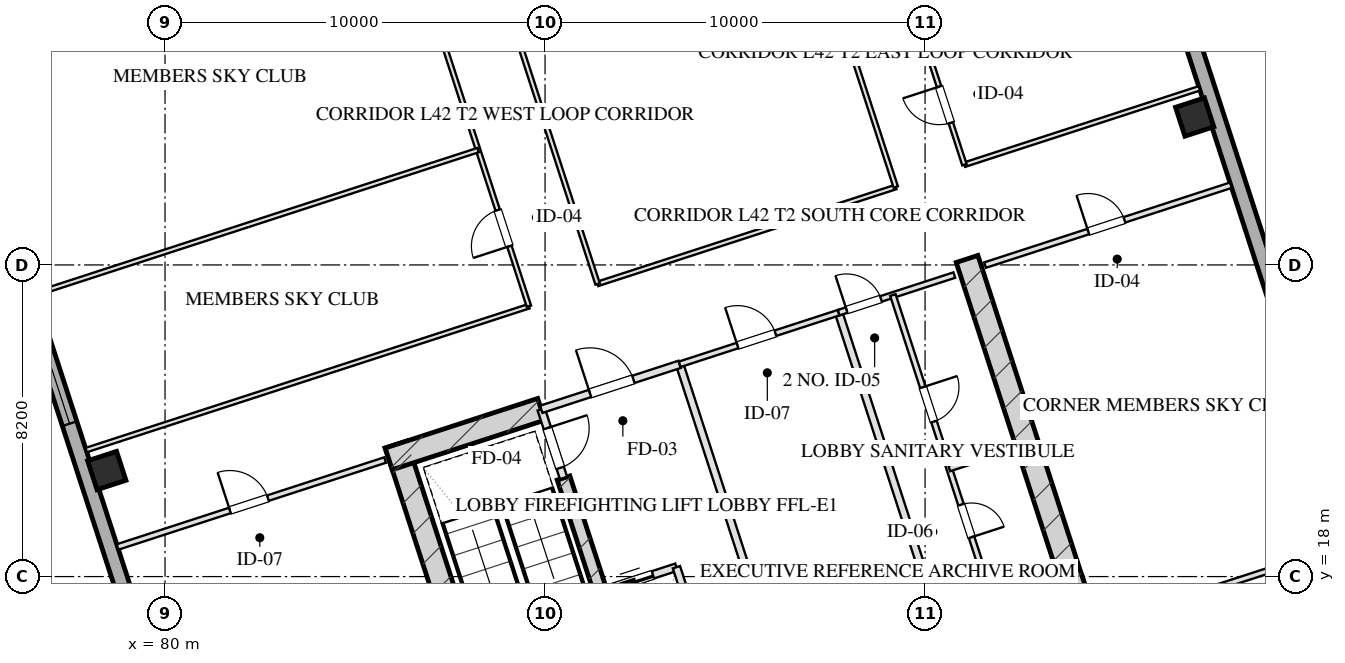
"""IFC4 building model, lengths in metres.
Left out: names, types, materials, properties, quantities, classifications, styles, units other than length and angle.
Written with IfcOpenShell. Run it as: python <this file> out.ifc"""

import sys

from ifc_helpers import new_model, si_unit, direction, frame, frame_2d, origin, origin_2d, place, context, subcontext, project, spatial, rectangle, hollow_rectangle, extrude, element, fill, save


model = new_model("IFC4")
c1 = context("Model", 3, precision=1e-05, world=origin(), true_north=direction((0.0, 1.0)))
c2 = subcontext(c1, "Body", "Model", "MODEL_VIEW")
j1 = project(units=[si_unit("LENGTHUNIT", "METRE"), si_unit("PLANEANGLEUNIT", "RADIAN")], contexts=[c1])
p1 = place(None, origin())
s1 = spatial("IfcSite", under=j1, at=p1, CompositionType="ELEMENT")
p2 = place(p1, origin())
s2 = spatial("IfcBuilding", under=s1, at=p2, CompositionType="ELEMENT")
p3 = place(p2, frame((0.0, 0.0, 159.85)))
s3 = spatial("IfcBuildingStorey", under=s2, at=p3, CompositionType="ELEMENT", Elevation=159.85)
p4 = place(p3, frame((88.63, 12.652, 0.0), z_axis=(0.0, 0.0, 1.0), x_axis=(0.95105714907, 0.309015046886, 0.0)))
e1 = element("IfcWall", 1, at=p4, inside=s3, PredefinedType="SHEAR", context=c2, shape_type="SweptSolid", body=[
    extrude(rectangle(XDim=16.4, YDim=0.6, at=frame_2d((8.2, 0.0))), origin(), (0.0, 0.0, 1.0), 3.45),
])
p5 = place(p3, frame((86.078, 21.475, 0.0), z_axis=(0.0, 0.0, 1.0), x_axis=(0.309017938678, -0.951056209472, 0.0)))
e2 = element("IfcWall", 2, at=p5, inside=s3, PredefinedType="SHEAR", context=c2, shape_type="SweptSolid", body=[
    extrude(rectangle(XDim=9.48, YDim=0.6, at=frame_2d((4.74, 0.0))), origin(), (0.0, 0.0, 1.0), 3.45),
])
p6 = place(p3, frame((101.105, 26.358, 0.0), z_axis=(0.0, 0.0, 1.0), x_axis=(0.309010370028, -0.95105866865, 0.0)))
e3 = element("IfcWall", 3, at=p6, inside=s3, PredefinedType="SHEAR", context=c2, shape_type="SweptSolid", body=[
    extrude(rectangle(XDim=9.48, YDim=0.6, at=frame_2d((4.74, 0.0))), origin(), (0.0, 0.0, 1.0), 3.45),
])
p7 = place(p3, frame((90.486, 20.594, 0.0), z_axis=(0.0, 0.0, 1.0), x_axis=(0.309020428229, -0.951055400562, 0.0)))
e4 = element("IfcWall", 4, at=p7, inside=s3, PredefinedType="SHEAR", context=c2, shape_type="SweptSolid", body=[
    extrude(rectangle(XDim=6.98, YDim=0.35, at=frame_2d((3.49, 0.0))), origin(), (0.0, 0.0, 1.0), 3.45),
])
p8 = place(p3, frame((85.886, 21.097, 0.0), z_axis=(0.0, 0.0, 1.0), x_axis=(0.951068073652, 0.308981422225, 0.0)))
e5 = element("IfcWall", 5, at=p8, inside=s3, PredefinedType="SHEAR", context=c2, shape_type="SweptSolid", body=[
    extrude(rectangle(XDim=4.22, YDim=0.6, at=frame_2d((2.11, 0.0))), origin(), (0.0, 0.0, 1.0), 3.45),
])
for number, where, z_axis, x_axis in (
    (6, (78.468, 20.79, 0.0), (0.0, 0.0, 1.0), (0.951, 0.309, 0.0)),
    (7, (107.094, 30.091, 0.0), (0.0, 0.0, 1.0), (0.951, 0.309, 0.0)),
):
    element("IfcColumn", number, at=place(p3, frame(where, z_axis=z_axis, x_axis=x_axis)), inside=s3, PredefinedType="COLUMN", context=c2, shape_type="SweptSolid", body=[
        extrude(hollow_rectangle(XDim=0.8, YDim=0.8, WallThickness=0.028, at=origin_2d()), origin(), (0.0, 0.0, 1.0), 3.451),
    ])
p9 = place(p3, frame((81.776, 8.827, 0.0), z_axis=(0.0, 0.0, 1.0), x_axis=(-0.309014228706, 0.951057414911, 0.0)))
e8 = element("IfcWall", 8, at=p9, inside=s3, PredefinedType="SOLIDWALL", context=c2, shape_type="SweptSolid", body=[
    extrude(rectangle(XDim=42.8, YDim=0.4, at=frame_2d((21.4, 0.0))), origin(), (0.0, 0.0, 1.0), 2.61),
])
p10 = place(p9, frame((13.875, 0.0, 0.75)))
e9 = element("IfcOpeningElement", 9, at=p10, cuts=e8, PredefinedType="OPENING", context=c2, shape_type="SweptSolid", body=[
    extrude(rectangle(XDim=2.25, YDim=1.46, at=frame_2d((1.125, 0.73))), frame((0.0, 0.21, 0.0), z_axis=(0.0, -1.0, 0.0), x_axis=(1.0, 0.0, 0.0)), (0.0, 0.0, 1.0), 0.42),
])
p11 = place(p9, frame((26.675, 0.0, 0.75)))
e10 = element("IfcOpeningElement", 10, at=p11, cuts=e8, PredefinedType="OPENING", context=c2, shape_type="SweptSolid", body=[
    extrude(rectangle(XDim=2.25, YDim=1.46, at=frame_2d((1.125, 0.73))), frame((0.0, 0.21, 0.0), z_axis=(0.0, -1.0, 0.0), x_axis=(1.0, 0.0, 0.0)), (0.0, 0.0, 1.0), 0.42),
])
p12 = place(p3, frame((98.224, 59.173, 0.0), z_axis=(0.0, 0.0, 1.0), x_axis=(0.309014228706, -0.951057414911, 0.0)))
e11 = element("IfcWall", 11, at=p12, inside=s3, PredefinedType="SOLIDWALL", context=c2, shape_type="SweptSolid", body=[
    extrude(rectangle(XDim=42.8, YDim=0.4, at=frame_2d((21.4, 0.0))), origin(), (0.0, 0.0, 1.0), 2.61),
])
p13 = place(p3, frame((89.899, 22.401, 0.0), z_axis=(0.0, 0.0, 1.0), x_axis=(0.308932062672, -0.951084108086, 0.0)))
e12 = element("IfcWall", 12, at=p13, inside=s3, PredefinedType="PARTITIONING", context=c2, shape_type="SweptSolid", body=[
    extrude(rectangle(XDim=1.9, YDim=0.2, at=frame_2d((0.95, 0.0))), origin(), (0.0, 0.0, 1.0), 3.175),
])
p14 = place(p13, frame((0.52, 0.0, 0.0)))
e13 = element("IfcOpeningElement", 13, at=p14, cuts=e12, PredefinedType="OPENING", context=c2, shape_type="SweptSolid", body=[
    extrude(rectangle(XDim=1.1, YDim=2.05, at=frame_2d((0.55, 1.025))), frame((0.0, 0.11, 0.0), z_axis=(0.0, -1.0, 0.0), x_axis=(1.0, 0.0, 0.0)), (0.0, 0.0, 1.0), 0.22),
])
p15 = place(p3, frame((93.542, 23.585, 0.0), z_axis=(0.0, 0.0, 1.0), x_axis=(0.309042196757, -0.951048327176, 0.0)))
e14 = element("IfcWall", 14, at=p15, inside=s3, PredefinedType="PARTITIONING", context=c2, shape_type="SweptSolid", body=[
    extrude(rectangle(XDim=8.43, YDim=0.2, at=frame_2d((4.215, 0.0))), origin(), (0.0, 0.0, 1.0), 3.175),
])
p16 = place(p3, frame((89.899, 22.401, 0.0), z_axis=(0.0, 0.0, 1.0), x_axis=(0.951046716504, 0.309047153403, 0.0)))
e15 = element("IfcWall", 15, at=p16, inside=s3, PredefinedType="PARTITIONING", context=c2, shape_type="SweptSolid", body=[
    extrude(rectangle(XDim=3.83, YDim=0.2, at=frame_2d((1.915, 0.0))), origin(), (0.0, 0.0, 1.0), 3.175),
])
p17 = place(p16, frame((1.35, 0.0, 0.0)))
e16 = element("IfcOpeningElement", 16, at=p17, cuts=e15, PredefinedType="OPENING", context=c2, shape_type="SweptSolid", body=[
    extrude(rectangle(XDim=1.2, YDim=2.05, at=frame_2d((0.6, 1.025))), frame((0.0, 0.11, 0.0), z_axis=(0.0, -1.0, 0.0), x_axis=(1.0, 0.0, 0.0)), (0.0, 0.0, 1.0), 0.22),
])
p18 = place(p3, frame((91.46, 17.598, 0.0), z_axis=(0.0, 0.0, 1.0), x_axis=(0.951062257173, 0.308999325213, 0.0)))
e17 = element("IfcWall", 17, at=p18, inside=s3, PredefinedType="PARTITIONING", context=c2, shape_type="SweptSolid", body=[
    extrude(rectangle(XDim=2.1, YDim=0.2, at=frame_2d((1.05, 0.0))), origin(), (0.0, 0.0, 1.0), 3.175),
])
p19 = place(p18, frame((0.35, 0.0, 0.0)))
e18 = element("IfcOpeningElement", 18, at=p19, cuts=e17, PredefinedType="OPENING", context=c2, shape_type="SweptSolid", body=[
    extrude(rectangle(XDim=1.1, YDim=2.05, at=frame_2d((0.55, 1.025))), frame((0.0, 0.11, 0.0), z_axis=(0.0, -1.0, 0.0), x_axis=(1.0, 0.0, 0.0)), (0.0, 0.0, 1.0), 0.22),
])
p20 = place(p3, frame((93.457, 18.247, 0.0), z_axis=(0.0, 0.0, 1.0), x_axis=(0.3089935693, -0.951064127245, 0.0)))
e19 = element("IfcWall", 19, at=p20, inside=s3, PredefinedType="PARTITIONING", context=c2, shape_type="SweptSolid", body=[
    extrude(rectangle(XDim=3.7, YDim=0.2, at=frame_2d((1.85, 0.0))), origin(), (0.0, 0.0, 1.0), 3.175),
])
p21 = place(p3, frame((97.727, 24.944, 0.0), z_axis=(0.0, 0.0, 1.0), x_axis=(0.309016001439, -0.951056838919, 0.0)))
e20 = element("IfcWall", 20, at=p21, inside=s3, PredefinedType="PARTITIONING", context=c2, shape_type="SweptSolid", body=[
    extrude(rectangle(XDim=8.43, YDim=0.2, at=frame_2d((4.215, 0.0))), origin(), (0.0, 0.0, 1.0), 3.175),
])
p22 = place(p3, frame((93.542, 23.585, 0.0), z_axis=(0.0, 0.0, 1.0), x_axis=(0.951063829732, 0.308994485023, 0.0)))
e21 = element("IfcWall", 21, at=p22, inside=s3, PredefinedType="PARTITIONING", context=c2, shape_type="SweptSolid", body=[
    extrude(rectangle(XDim=4.4, YDim=0.15, at=frame_2d((2.2, 0.0))), origin(), (0.0, 0.0, 1.0), 3.175),
])
p23 = place(p22, frame((1.6, 0.0, 0.0)))
e22 = element("IfcOpeningElement", 22, at=p23, cuts=e21, PredefinedType="OPENING", context=c2, shape_type="SweptSolid", body=[
    extrude(rectangle(XDim=1.05, YDim=2.05, at=frame_2d((0.525, 1.025))), frame((0.0, 0.085, 0.0), z_axis=(0.0, -1.0, 0.0), x_axis=(1.0, 0.0, 0.0)), (0.0, 0.0, 1.0), 0.17),
])
p24 = place(p3, frame((97.727, 24.944, 0.0), z_axis=(0.0, 0.0, 1.0), x_axis=(0.951036872128, 0.309077446369, 0.0)))
e23 = element("IfcWall", 23, at=p24, inside=s3, PredefinedType="PARTITIONING", context=c2, shape_type="SweptSolid", body=[
    extrude(rectangle(XDim=3.2, YDim=0.15, at=frame_2d((1.6, 0.0))), origin(), (0.0, 0.0, 1.0), 3.175),
])
p25 = place(p24, frame((0.22, 0.0, 0.0)))
e24 = element("IfcOpeningElement", 24, at=p25, cuts=e23, PredefinedType="OPENING", context=c2, shape_type="SweptSolid", body=[
    extrude(rectangle(XDim=0.95, YDim=2.05, at=frame_2d((0.475, 1.025))), frame((0.0, 0.085, 0.0), z_axis=(0.0, -1.0, 0.0), x_axis=(1.0, 0.0, 0.0)), (0.0, 0.0, 1.0), 0.17),
])
p26 = place(p3, frame((99.153, 25.408, 0.0), z_axis=(0.0, 0.0, 1.0), x_axis=(0.309016001439, -0.951056838919, 0.0)))
e25 = element("IfcWall", 25, at=p26, inside=s3, PredefinedType="PARTITIONING", context=c2, shape_type="SweptSolid", body=[
    extrude(rectangle(XDim=8.43, YDim=0.15, at=frame_2d((4.215, 0.0))), origin(), (0.0, 0.0, 1.0), 3.175),
])
p27 = place(p26, frame((2.55, 0.0, 0.0)))
e26 = element("IfcOpeningElement", 26, at=p27, cuts=e25, PredefinedType="OPENING", context=c2, shape_type="SweptSolid", body=[
    extrude(rectangle(XDim=0.95, YDim=2.05, at=frame_2d((0.475, 1.025))), frame((0.0, 0.085, 0.0), z_axis=(0.0, -1.0, 0.0), x_axis=(1.0, 0.0, 0.0)), (0.0, 0.0, 1.0), 0.17),
])
p28 = place(p26, frame((5.8, 0.0, 0.0)))
e27 = element("IfcOpeningElement", 27, at=p28, cuts=e25, PredefinedType="OPENING", context=c2, shape_type="SweptSolid", body=[
    extrude(rectangle(XDim=0.9, YDim=2.05, at=frame_2d((0.45, 1.025))), frame((0.0, 0.085, 0.0), z_axis=(0.0, -1.0, 0.0), x_axis=(1.0, 0.0, 0.0)), (0.0, 0.0, 1.0), 0.17),
])
p29 = place(p3, frame((100.636, 20.843, 0.0), z_axis=(0.0, 0.0, 1.0), x_axis=(0.951040401051, 0.309066587596, 0.0)))
e28 = element("IfcWall", 28, at=p29, inside=s3, PredefinedType="PARTITIONING", context=c2, shape_type="SweptSolid", body=[
    extrude(rectangle(XDim=1.7, YDim=0.15, at=frame_2d((0.85, 0.0))), origin(), (0.0, 0.0, 1.0), 3.175),
])
p30 = place(p3, frame((78.753, 18.78, 0.0), z_axis=(0.0, 0.0, 1.0), x_axis=(0.951060977215, 0.309003264738, 0.0)))
e29 = element("IfcWall", 29, at=p30, inside=s3, PredefinedType="PARTITIONING", context=c2, shape_type="SweptSolid", body=[
    extrude(rectangle(XDim=7.4, YDim=0.15, at=frame_2d((3.7, 0.0))), origin(), (0.0, 0.0, 1.0), 3.175),
])
p31 = place(p30, frame((3.108, 0.0, 0.0)))
e30 = element("IfcOpeningElement", 30, at=p31, cuts=e29, PredefinedType="OPENING", context=c2, shape_type="SweptSolid", body=[
    extrude(rectangle(XDim=1.05, YDim=2.05, at=frame_2d((0.525, 1.025))), frame((0.0, 0.085, 0.0), z_axis=(0.0, -1.0, 0.0), x_axis=(1.0, 0.0, 0.0)), (0.0, 0.0, 1.0), 0.17),
])
p32 = place(p3, frame((104.653, 16.733, 0.0), z_axis=(0.0, 0.0, 1.0), x_axis=(0.951054383043, 0.309023559774, 0.0)))
e31 = element("IfcWall", 31, at=p32, inside=s3, PredefinedType="PARTITIONING", context=c2, shape_type="SweptSolid", body=[
    extrude(rectangle(XDim=6.8, YDim=0.15, at=frame_2d((3.4, 0.0))), origin(), (0.0, 0.0, 1.0), 3.175),
])
p33 = place(p3, frame((101.578, 26.196, 0.0), z_axis=(0.0, 0.0, 1.0), x_axis=(0.951064934653, 0.308991084134, 0.0)))
e32 = element("IfcWall", 32, at=p33, inside=s3, PredefinedType="PARTITIONING", context=c2, shape_type="SweptSolid", body=[
    extrude(rectangle(XDim=6.8, YDim=0.15, at=frame_2d((3.4, 0.0))), origin(), (0.0, 0.0, 1.0), 3.175),
])
p34 = place(p33, frame((2.856, 0.0, 0.0)))
e33 = element("IfcOpeningElement", 33, at=p34, cuts=e32, PredefinedType="OPENING", context=c2, shape_type="SweptSolid", body=[
    extrude(rectangle(XDim=1.0, YDim=2.05, at=frame_2d((0.5, 1.025))), frame((0.0, 0.085, 0.0), z_axis=(0.0, -1.0, 0.0), x_axis=(1.0, 0.0, 0.0)), (0.0, 0.0, 1.0), 0.17),
])
p35 = place(p3, frame((77.925, 21.328, 0.0), z_axis=(0.0, 0.0, 1.0), x_axis=(0.95105749975, 0.309013967595, 0.0)))
e34 = element("IfcWall", 34, at=p35, inside=s3, PredefinedType="PARTITIONING", context=c2, shape_type="SweptSolid", body=[
    extrude(rectangle(XDim=12.25, YDim=0.12, at=frame_2d((6.125, 0.0))), origin(), (0.0, 0.0, 1.0), 3.175),
])
p36 = place(p3, frame((91.382, 25.701, 0.0), z_axis=(0.0, 0.0, 1.0), x_axis=(0.951061683147, 0.309001091988, 0.0)))
e35 = element("IfcWall", 35, at=p36, inside=s3, PredefinedType="PARTITIONING", context=c2, shape_type="SweptSolid", body=[
    extrude(rectangle(XDim=8.25, YDim=0.12, at=frame_2d((4.125, 0.0))), origin(), (0.0, 0.0, 1.0), 3.175),
])
p37 = place(p3, frame((101.035, 28.837, 0.0), z_axis=(0.0, 0.0, 1.0), x_axis=(0.95104869662, 0.309041059824, 0.0)))
e36 = element("IfcWall", 36, at=p37, inside=s3, PredefinedType="PARTITIONING", context=c2, shape_type="SweptSolid", body=[
    extrude(rectangle(XDim=6.5, YDim=0.12, at=frame_2d((3.25, 0.0))), origin(), (0.0, 0.0, 1.0), 3.175),
])
p38 = place(p3, frame((89.575, 25.114, 0.0), z_axis=(0.0, 0.0, 1.0), x_axis=(-0.30901773025, 0.951056277195, 0.0)))
e37 = element("IfcWall", 37, at=p38, inside=s3, PredefinedType="PARTITIONING", context=c2, shape_type="SweptSolid", body=[
    extrude(rectangle(XDim=16.64, YDim=0.12, at=frame_2d((8.32, 0.0))), origin(), (0.0, 0.0, 1.0), 3.175),
])
p39 = place(p38, frame((1.66, 0.0, 0.0)))
e38 = element("IfcOpeningElement", 38, at=p39, cuts=e37, PredefinedType="OPENING", context=c2, shape_type="SweptSolid", body=[
    extrude(rectangle(XDim=1.0, YDim=2.05, at=frame_2d((0.5, 1.025))), frame((0.0, 0.07, 0.0), z_axis=(0.0, -1.0, 0.0), x_axis=(1.0, 0.0, 0.0)), (0.0, 0.0, 1.0), 0.14),
])
p40 = place(p38, frame((7.82, 0.0, 0.0)))
e39 = element("IfcOpeningElement", 39, at=p40, cuts=e37, PredefinedType="OPENING", context=c2, shape_type="SweptSolid", body=[
    extrude(rectangle(XDim=1.0, YDim=2.05, at=frame_2d((0.5, 1.025))), frame((0.0, 0.07, 0.0), z_axis=(0.0, -1.0, 0.0), x_axis=(1.0, 0.0, 0.0)), (0.0, 0.0, 1.0), 0.14),
])
p41 = place(p38, frame((13.98, 0.0, 0.0)))
e40 = element("IfcOpeningElement", 40, at=p41, cuts=e37, PredefinedType="OPENING", context=c2, shape_type="SweptSolid", body=[
    extrude(rectangle(XDim=1.0, YDim=2.05, at=frame_2d((0.5, 1.025))), frame((0.0, 0.07, 0.0), z_axis=(0.0, -1.0, 0.0), x_axis=(1.0, 0.0, 0.0)), (0.0, 0.0, 1.0), 0.14),
])
p42 = place(p3, frame((91.382, 25.701, 0.0), z_axis=(0.0, 0.0, 1.0), x_axis=(-0.309004459387, 0.951060589068, 0.0)))
e41 = element("IfcWall", 41, at=p42, inside=s3, PredefinedType="PARTITIONING", context=c2, shape_type="SweptSolid", body=[
    extrude(rectangle(XDim=16.64, YDim=0.12, at=frame_2d((8.32, 0.0))), origin(), (0.0, 0.0, 1.0), 3.175),
])
p43 = place(p42, frame((7.987, 0.0, 0.0)))
e42 = element("IfcOpeningElement", 42, at=p43, cuts=e41, PredefinedType="OPENING", context=c2, shape_type="SweptSolid", body=[
    extrude(rectangle(XDim=1.1, YDim=2.05, at=frame_2d((0.55, 1.025))), frame((0.0, 0.07, 0.0), z_axis=(0.0, -1.0, 0.0), x_axis=(1.0, 0.0, 0.0)), (0.0, 0.0, 1.0), 0.14),
])
p44 = place(p3, frame((99.229, 28.25, 0.0), z_axis=(0.0, 0.0, 1.0), x_axis=(-0.30901773025, 0.951056277195, 0.0)))
e43 = element("IfcWall", 43, at=p44, inside=s3, PredefinedType="PARTITIONING", context=c2, shape_type="SweptSolid", body=[
    extrude(rectangle(XDim=16.64, YDim=0.12, at=frame_2d((8.32, 0.0))), origin(), (0.0, 0.0, 1.0), 3.175),
])
p45 = place(p3, frame((101.035, 28.837, 0.0), z_axis=(0.0, 0.0, 1.0), x_axis=(-0.30901773025, 0.951056277195, 0.0)))
e44 = element("IfcWall", 44, at=p45, inside=s3, PredefinedType="PARTITIONING", context=c2, shape_type="SweptSolid", body=[
    extrude(rectangle(XDim=16.64, YDim=0.12, at=frame_2d((8.32, 0.0))), origin(), (0.0, 0.0, 1.0), 3.175),
])
p46 = place(p45, frame((1.16, 0.0, 0.0)))
e45 = element("IfcOpeningElement", 45, at=p46, cuts=e44, PredefinedType="OPENING", context=c2, shape_type="SweptSolid", body=[
    extrude(rectangle(XDim=1.0, YDim=2.05, at=frame_2d((0.5, 1.025))), frame((0.0, 0.07, 0.0), z_axis=(0.0, -1.0, 0.0), x_axis=(1.0, 0.0, 0.0)), (0.0, 0.0, 1.0), 0.14),
])
p47 = place(p45, frame((4.72, 0.0, 0.0)))
e46 = element("IfcOpeningElement", 46, at=p47, cuts=e44, PredefinedType="OPENING", context=c2, shape_type="SweptSolid", body=[
    extrude(rectangle(XDim=1.0, YDim=2.05, at=frame_2d((0.5, 1.025))), frame((0.0, 0.07, 0.0), z_axis=(0.0, -1.0, 0.0), x_axis=(1.0, 0.0, 0.0)), (0.0, 0.0, 1.0), 0.14),
])
p48 = place(p45, frame((7.82, 0.0, 0.0)))
e47 = element("IfcOpeningElement", 47, at=p48, cuts=e44, PredefinedType="OPENING", context=c2, shape_type="SweptSolid", body=[
    extrude(rectangle(XDim=0.85, YDim=2.05, at=frame_2d((0.425, 1.025))), frame((0.0, 0.07, 0.0), z_axis=(0.0, -1.0, 0.0), x_axis=(1.0, 0.0, 0.0)), (0.0, 0.0, 1.0), 0.14),
])
p49 = place(p45, frame((10.671, 0.0, 0.0)))
e48 = element("IfcOpeningElement", 48, at=p49, cuts=e44, PredefinedType="OPENING", context=c2, shape_type="SweptSolid", body=[
    extrude(rectangle(XDim=1.0, YDim=2.05, at=frame_2d((0.5, 1.025))), frame((0.0, 0.07, 0.0), z_axis=(0.0, -1.0, 0.0), x_axis=(1.0, 0.0, 0.0)), (0.0, 0.0, 1.0), 0.14),
])
p50 = place(p45, frame((13.971, 0.0, 0.0)))
e49 = element("IfcOpeningElement", 49, at=p50, cuts=e44, PredefinedType="OPENING", context=c2, shape_type="SweptSolid", body=[
    extrude(rectangle(XDim=1.0, YDim=2.05, at=frame_2d((0.5, 1.025))), frame((0.0, 0.07, 0.0), z_axis=(0.0, -1.0, 0.0), x_axis=(1.0, 0.0, 0.0)), (0.0, 0.0, 1.0), 0.14),
])
p51 = place(p3, frame((76.59, 25.437, 0.0), z_axis=(0.0, 0.0, 1.0), x_axis=(0.95105749975, 0.309013967595, 0.0)))
e50 = element("IfcWall", 50, at=p51, inside=s3, PredefinedType="PARTITIONING", context=c2, shape_type="SweptSolid", body=[
    extrude(rectangle(XDim=12.25, YDim=0.12, at=frame_2d((6.125, 0.0))), origin(), (0.0, 0.0, 1.0), 3.175),
])
p52 = place(p10, origin())
e51 = element("IfcWindow", 51, at=p52, inside=s3, PartitioningType="TRIPLE_PANEL_VERTICAL", PredefinedType="WINDOW", context=c2, shape_type="SweptSolid", body=[
    extrude(rectangle(XDim=2.25, YDim=1.46, at=frame_2d((1.125, 0.73))), frame((0.0, 0.03, 0.0), z_axis=(0.0, -1.0, 0.0), x_axis=(1.0, 0.0, 0.0)), (0.0, 0.0, 1.0), 0.06),
])
fill(e9, e51)
p53 = place(p14, origin())
e52 = element("IfcDoor", 52, at=p53, inside=s3, OperationType="SINGLE_SWING_LEFT", PredefinedType="DOOR", context=c2, shape_type="SweptSolid", body=[
    extrude(rectangle(XDim=1.1, YDim=2.05, at=frame_2d((0.55, 1.025))), frame((0.0, 0.025, 0.0), z_axis=(0.0, -1.0, 0.0), x_axis=(1.0, 0.0, 0.0)), (0.0, 0.0, 1.0), 0.05),
])
fill(e13, e52)
p54 = place(p17, origin())
e53 = element("IfcDoor", 53, at=p54, inside=s3, OperationType="SINGLE_SWING_LEFT", PredefinedType="DOOR", context=c2, shape_type="SweptSolid", body=[
    extrude(rectangle(XDim=1.2, YDim=2.05, at=frame_2d((0.6, 1.025))), frame((0.0, 0.025, 0.0), z_axis=(0.0, -1.0, 0.0), x_axis=(1.0, 0.0, 0.0)), (0.0, 0.0, 1.0), 0.05),
])
fill(e16, e53)
p55 = place(p19, origin())
e54 = element("IfcDoor", 54, at=p55, inside=s3, OperationType="DOUBLE_DOOR_SLIDING", PredefinedType="DOOR", context=c2, shape_type="SweptSolid", body=[
    extrude(rectangle(XDim=1.1, YDim=2.05, at=frame_2d((0.55, 1.025))), frame((0.0, 0.025, 0.0), z_axis=(0.0, -1.0, 0.0), x_axis=(1.0, 0.0, 0.0)), (0.0, 0.0, 1.0), 0.05),
])
fill(e18, e54)
p56 = place(p23, origin())
e55 = element("IfcDoor", 55, at=p56, inside=s3, OperationType="SINGLE_SWING_LEFT", PredefinedType="DOOR", context=c2, shape_type="SweptSolid", body=[
    extrude(rectangle(XDim=1.05, YDim=2.05, at=frame_2d((0.525, 1.025))), frame((0.0, 0.025, 0.0), z_axis=(0.0, -1.0, 0.0), x_axis=(1.0, 0.0, 0.0)), (0.0, 0.0, 1.0), 0.05),
])
fill(e22, e55)
p57 = place(p25, origin())
e56 = element("IfcDoor", 56, at=p57, inside=s3, OperationType="SINGLE_SWING_LEFT", PredefinedType="DOOR", context=c2, shape_type="SweptSolid", body=[
    extrude(rectangle(XDim=0.95, YDim=2.05, at=frame_2d((0.475, 1.025))), frame((0.0, 0.025, 0.0), z_axis=(0.0, -1.0, 0.0), x_axis=(1.0, 0.0, 0.0)), (0.0, 0.0, 1.0), 0.05),
])
fill(e24, e56)
p58 = place(p27, origin())
e57 = element("IfcDoor", 57, at=p58, inside=s3, OperationType="SINGLE_SWING_LEFT", PredefinedType="DOOR", context=c2, shape_type="SweptSolid", body=[
    extrude(rectangle(XDim=0.95, YDim=2.05, at=frame_2d((0.475, 1.025))), frame((0.0, 0.025, 0.0), z_axis=(0.0, -1.0, 0.0), x_axis=(1.0, 0.0, 0.0)), (0.0, 0.0, 1.0), 0.05),
])
fill(e26, e57)
p59 = place(p28, origin())
e58 = element("IfcDoor", 58, at=p59, inside=s3, OperationType="SINGLE_SWING_RIGHT", PredefinedType="DOOR", context=c2, shape_type="SweptSolid", body=[
    extrude(rectangle(XDim=0.9, YDim=2.05, at=frame_2d((0.45, 1.025))), frame((0.0, 0.025, 0.0), z_axis=(0.0, -1.0, 0.0), x_axis=(1.0, 0.0, 0.0)), (0.0, 0.0, 1.0), 0.05),
])
fill(e27, e58)
p60 = place(p31, origin())
e59 = element("IfcDoor", 59, at=p60, inside=s3, OperationType="SINGLE_SWING_LEFT", PredefinedType="DOOR", context=c2, shape_type="SweptSolid", body=[
    extrude(rectangle(XDim=1.05, YDim=2.05, at=frame_2d((0.525, 1.025))), frame((0.0, 0.025, 0.0), z_axis=(0.0, -1.0, 0.0), x_axis=(1.0, 0.0, 0.0)), (0.0, 0.0, 1.0), 0.05),
])
fill(e30, e59)
p61 = place(p34, origin())
e60 = element("IfcDoor", 60, at=p61, inside=s3, OperationType="SINGLE_SWING_LEFT", PredefinedType="DOOR", context=c2, shape_type="SweptSolid", body=[
    extrude(rectangle(XDim=1.0, YDim=2.05, at=frame_2d((0.5, 1.025))), frame((0.0, 0.025, 0.0), z_axis=(0.0, -1.0, 0.0), x_axis=(1.0, 0.0, 0.0)), (0.0, 0.0, 1.0), 0.05),
])
fill(e33, e60)
p62 = place(p39, origin())
e61 = element("IfcDoor", 61, at=p62, inside=s3, OperationType="SINGLE_SWING_LEFT", PredefinedType="DOOR", context=c2, shape_type="SweptSolid", body=[
    extrude(rectangle(XDim=1.0, YDim=2.05, at=frame_2d((0.5, 1.025))), frame((0.0, 0.025, 0.0), z_axis=(0.0, -1.0, 0.0), x_axis=(1.0, 0.0, 0.0)), (0.0, 0.0, 1.0), 0.05),
])
fill(e38, e61)
p63 = place(p46, origin())
e62 = element("IfcDoor", 62, at=p63, inside=s3, OperationType="SINGLE_SWING_RIGHT", PredefinedType="DOOR", context=c2, shape_type="SweptSolid", body=[
    extrude(rectangle(XDim=1.0, YDim=2.05, at=frame_2d((0.5, 1.025))), frame((0.0, 0.025, 0.0), z_axis=(0.0, -1.0, 0.0), x_axis=(1.0, 0.0, 0.0)), (0.0, 0.0, 1.0), 0.05),
])
fill(e45, e62)
save(model, sys.argv[1])
